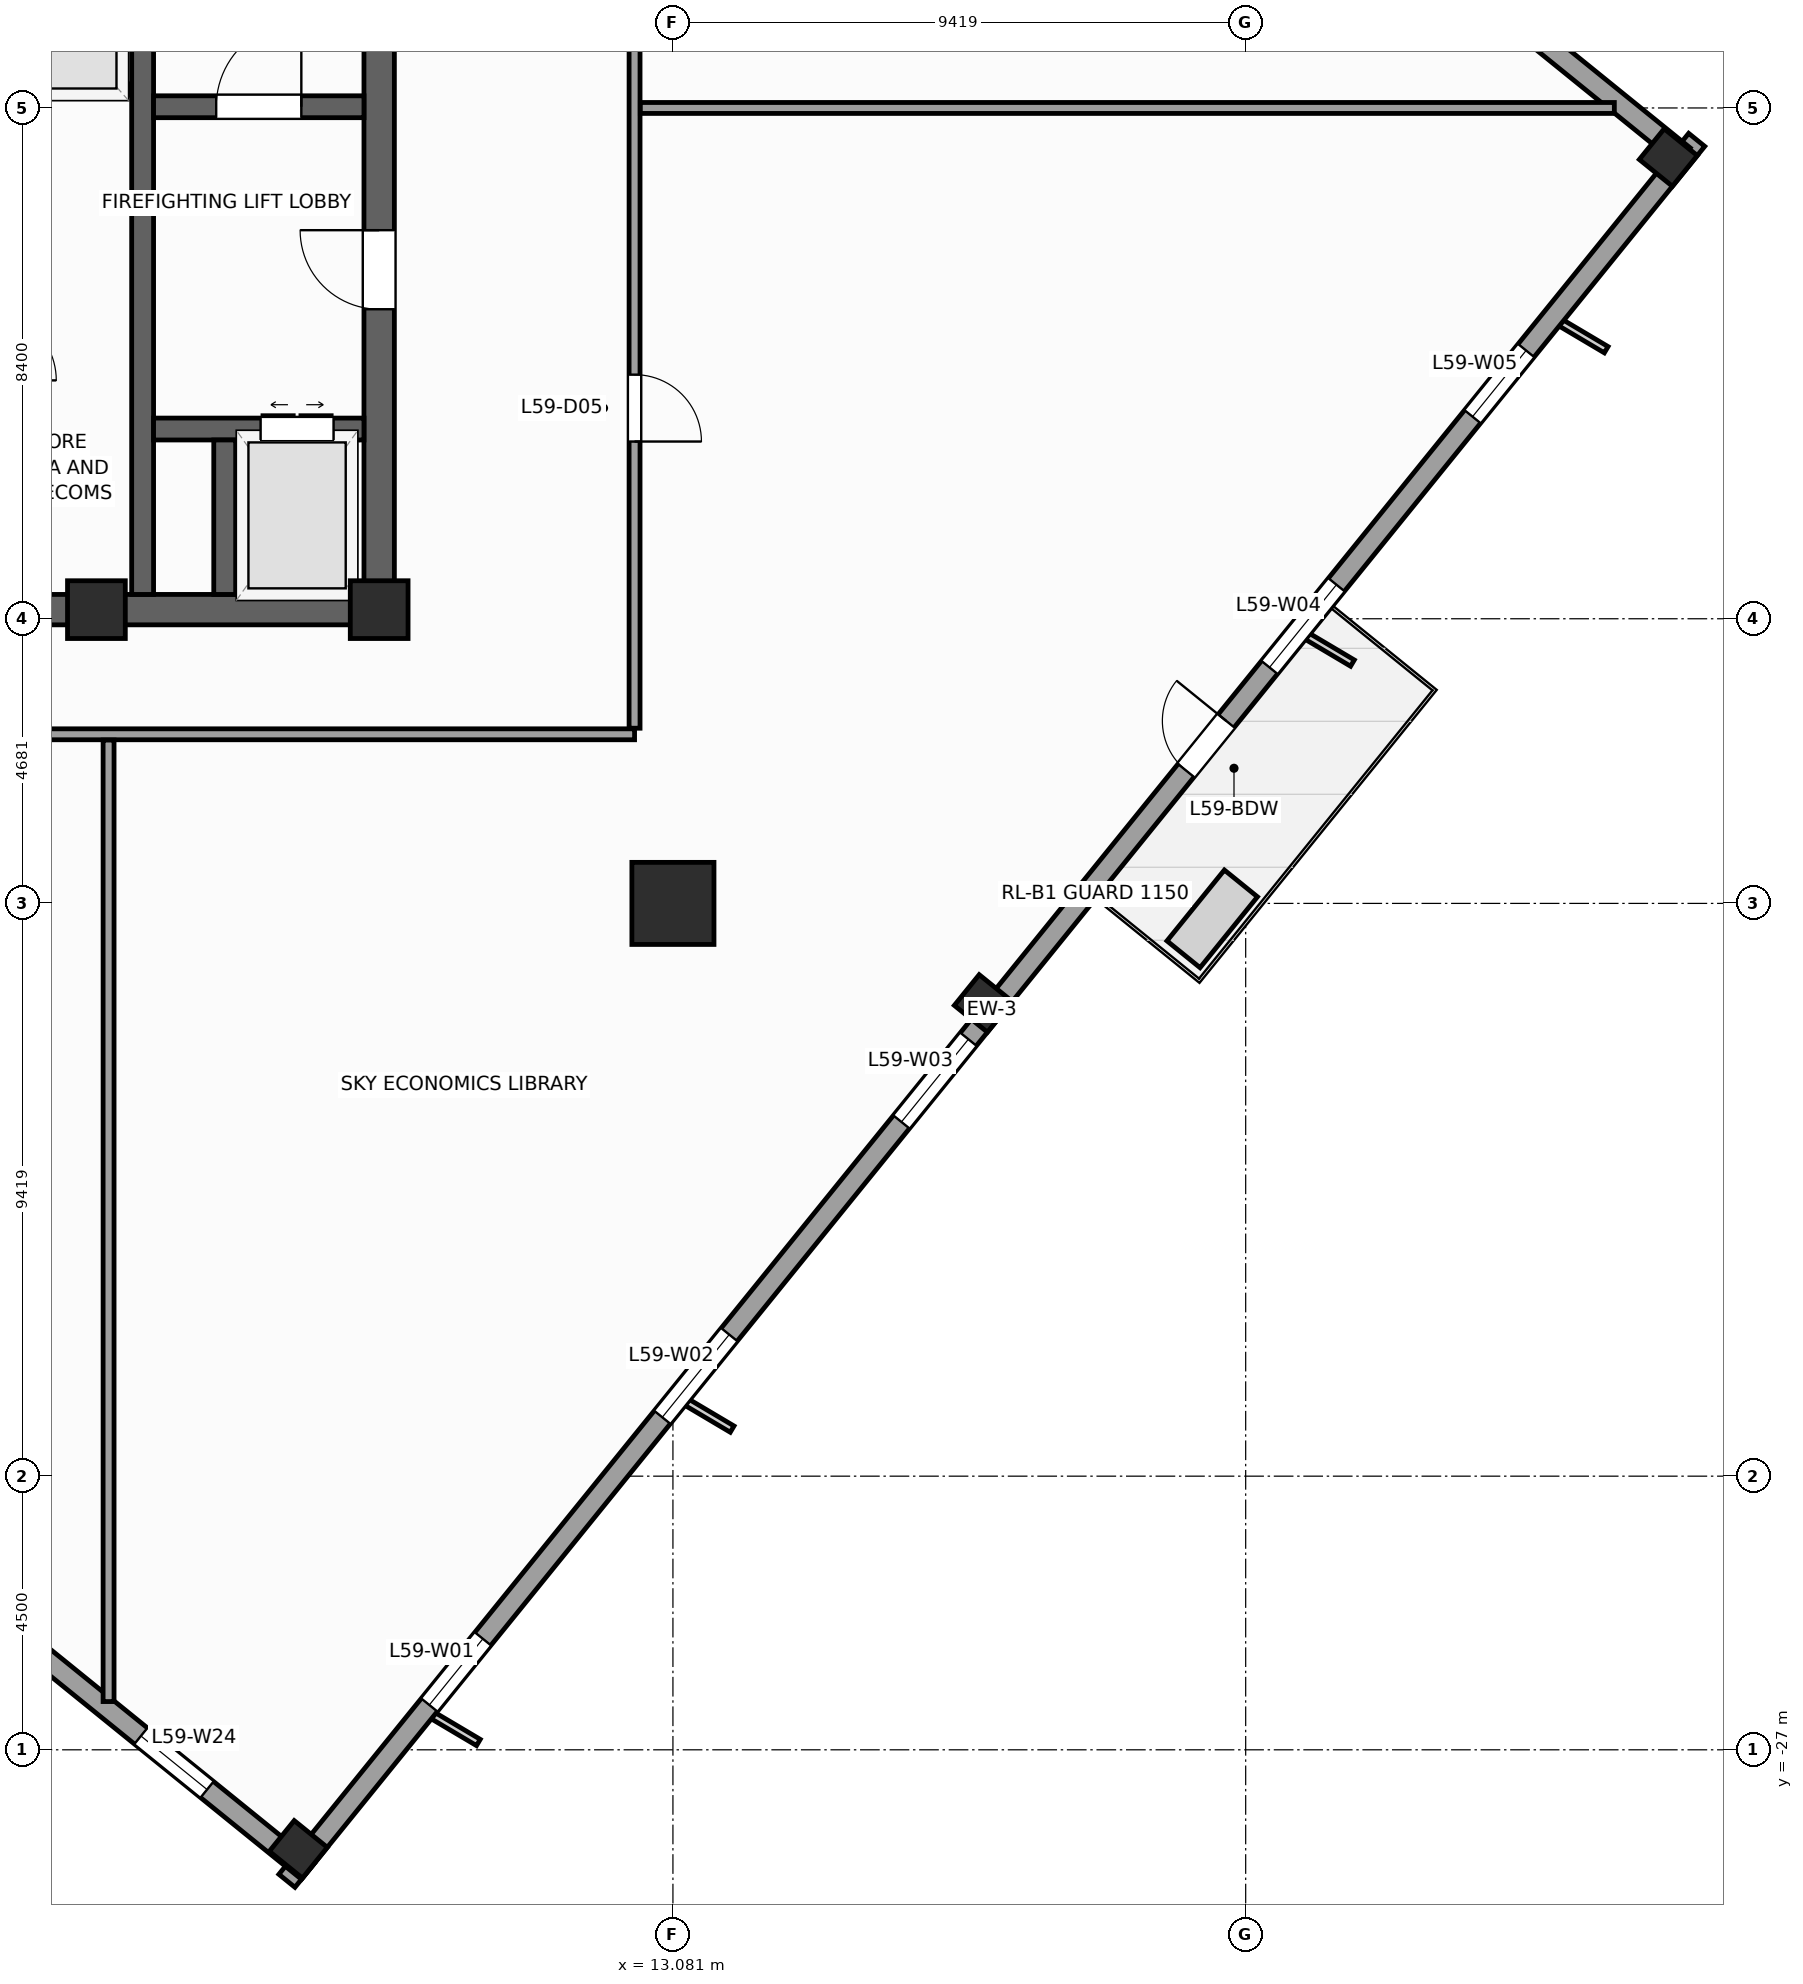
"""IFC4 building model, lengths in metres.
Left out: names, types, materials, properties, quantities, classifications, styles, units other than length and angle.
Written with IfcOpenShell. Run it as: python <this file> out.ifc"""

import sys

from ifc_helpers import new_model, si_unit, direction, frame, frame_2d, origin, origin_2d, place, context, subcontext, project, spatial, rectangle, extrude, source, transform, mapped, element, fill, save


model = new_model("IFC4")
c1 = context("Model", 3, precision=1e-05, world=origin(), true_north=direction((0.0, 1.0)))
c2 = subcontext(c1, "Body", "Model", "MODEL_VIEW")
j1 = project(units=[si_unit("LENGTHUNIT", "METRE"), si_unit("PLANEANGLEUNIT", "RADIAN")], contexts=[c1])
p1 = place(None, origin())
s1 = spatial("IfcSite", under=j1, at=p1, CompositionType="ELEMENT")
p2 = place(p1, origin())
s2 = spatial("IfcBuilding", under=s1, at=p2, CompositionType="ELEMENT")
p3 = place(p2, frame((0.0, 0.0, 244.6)))
s3 = spatial("IfcBuildingStorey", under=s2, at=p3, CompositionType="ELEMENT", Elevation=244.6)
p4 = place(p3, frame((-8.5, -8.25, 0.0), z_axis=(0.0, 0.0, 1.0), x_axis=(1.0, 0.0, 0.0)))
e1 = element("IfcWall", 1, at=p4, inside=s3, PredefinedType="SHEAR", context=c2, shape_type="SweptSolid", body=[
    extrude(rectangle(XDim=17.0, YDim=0.5, at=frame_2d((8.5, 0.0))), origin(), (0.0, 0.0, 1.0), 3.9),
])
p5 = place(p4, frame((7.85, 0.0, 0.0)))
e2 = element("IfcOpeningElement", 2, at=p5, cuts=e1, PredefinedType="OPENING", context=c2, shape_type="SweptSolid", body=[
    extrude(rectangle(XDim=1.3, YDim=2.2, at=frame_2d((0.65, 1.1))), frame((0.0, 0.26, 0.0), z_axis=(0.0, -1.0, 0.0), x_axis=(1.0, 0.0, 0.0)), (0.0, 0.0, 1.0), 0.52),
])
p6 = place(p3, frame((8.25, -8.0, 0.0), z_axis=(0.0, 0.0, 1.0), x_axis=(0.0, 1.0, 0.0)))
e3 = element("IfcWall", 3, at=p6, inside=s3, PredefinedType="SHEAR", context=c2, shape_type="SweptSolid", body=[
    extrude(rectangle(XDim=16.0, YDim=0.5, at=frame_2d((8.0, 0.0))), origin(), (0.0, 0.0, 1.0), 3.9),
])
p7 = place(p6, frame((4.69, 0.0, 0.0)))
e4 = element("IfcOpeningElement", 4, at=p7, cuts=e3, PredefinedType="OPENING", context=c2, shape_type="SweptSolid", body=[
    extrude(rectangle(XDim=1.3, YDim=2.2, at=frame_2d((0.65, 1.1))), frame((0.0, 0.26, 0.0), z_axis=(0.0, -1.0, 0.0), x_axis=(1.0, 0.0, 0.0)), (0.0, 0.0, 1.0), 0.52),
])
p8 = place(p3, frame((4.36, -8.0, 0.0), z_axis=(0.0, 0.0, 1.0), x_axis=(0.0, 1.0, 0.0)))
e5 = element("IfcWall", 5, at=p8, inside=s3, PredefinedType="SHEAR", context=c2, shape_type="SweptSolid", body=[
    extrude(rectangle(XDim=16.0, YDim=0.36, at=frame_2d((8.0, 0.0))), origin(), (0.0, 0.0, 1.0), 3.9),
])
p9 = place(p3, frame((4.54, 0.02, 0.0), z_axis=(0.0, 0.0, 1.0), x_axis=(1.0, 0.0, 0.0)))
e6 = element("IfcWall", 6, at=p9, inside=s3, PredefinedType="SHEAR", context=c2, shape_type="SweptSolid", body=[
    extrude(rectangle(XDim=3.46, YDim=0.36, at=frame_2d((1.73, 0.0))), origin(), (0.0, 0.0, 1.0), 3.9),
])
p10 = place(p9, frame((1.03, 0.0, 0.0)))
e7 = element("IfcOpeningElement", 7, at=p10, cuts=e6, PredefinedType="OPENING", context=c2, shape_type="SweptSolid", body=[
    extrude(rectangle(XDim=1.4, YDim=2.2, at=frame_2d((0.7, 1.1))), frame((0.0, 0.19, 0.0), z_axis=(0.0, -1.0, 0.0), x_axis=(1.0, 0.0, 0.0)), (0.0, 0.0, 1.0), 0.38),
])
p11 = place(p3, frame((4.54, -5.28, 0.0), z_axis=(0.0, 0.0, 1.0), x_axis=(1.0, 0.0, 0.0)))
e8 = element("IfcWall", 8, at=p11, inside=s3, PredefinedType="SHEAR", context=c2, shape_type="SweptSolid", body=[
    extrude(rectangle(XDim=3.46, YDim=0.36, at=frame_2d((1.73, 0.0))), origin(), (0.0, 0.0, 1.0), 3.9),
])
p12 = place(p11, frame((1.76, 0.0, 0.0)))
e9 = element("IfcOpeningElement", 9, at=p12, cuts=e8, PredefinedType="OPENING", context=c2, shape_type="SweptSolid", body=[
    extrude(rectangle(XDim=1.2, YDim=2.25, at=frame_2d((0.6, 1.125))), frame((0.0, 0.19, 0.0), z_axis=(0.0, -1.0, 0.0), x_axis=(1.0, 0.0, 0.0)), (0.0, 0.0, 1.0), 0.38),
])
p13 = place(p3, frame((5.71, -8.0, 0.0), z_axis=(0.0, 0.0, 1.0), x_axis=(0.0, 1.0, 0.0)))
e10 = element("IfcWall", 10, at=p13, inside=s3, PredefinedType="SHEAR", context=c2, shape_type="SweptSolid", body=[
    extrude(rectangle(XDim=2.54, YDim=0.36, at=frame_2d((1.27, 0.0))), origin(), (0.0, 0.0, 1.0), 3.9),
])
m1 = source(origin(), c2, "Body", "SweptSolid", [
    extrude(rectangle(XDim=0.95, YDim=0.95, at=origin_2d()), origin(), (0.0, 0.0, 1.0), 3.9),
])
for number, where, z_axis, x_axis in (
    (11, (8.25, -8.25, 0.0), (0.0, 0.0, 1.0), (1.0, 0.0, 0.0)),
    (12, (3.6, -8.25, 0.0), (0.0, 0.0, 1.0), (1.0, 0.0, 0.0)),
):
    element("IfcColumn", number, at=place(p3, frame(where, z_axis=z_axis, x_axis=x_axis)), inside=s3, PredefinedType="PILASTER", context=c2, shape_type="MappedRepresentation", body=[
        mapped(m1, transform((0.0, 0.0, 0.0), scale=1.0)),
    ])
m2 = source(origin(), c2, "Body", "SweptSolid", [
    extrude(rectangle(XDim=1.35, YDim=1.35, at=origin_2d()), origin(), (0.0, 0.0, 1.0), 3.9),
])
p14 = place(p3, frame((13.081, -13.081, 0.0), z_axis=(0.0, 0.0, 1.0), x_axis=(1.0, 0.0, 0.0)))
e13 = element("IfcColumn", 13, at=p14, inside=s3, PredefinedType="COLUMN", context=c2, shape_type="MappedRepresentation", body=[
    mapped(m2, transform((0.0, 0.0, 0.0), scale=1.0)),
])
m3 = source(origin(), c2, "Body", "SweptSolid", [
    extrude(rectangle(XDim=0.65, YDim=0.7, at=origin_2d()), origin(), (0.0, 0.0, 1.0), 3.9),
])
for number, where, z_axis, x_axis in (
    (14, (6.92, -28.637, 0.0), (0.0, 0.0, 1.0), (0.629, 0.777, 0.0)),
    (15, (18.185, -14.726, 0.0), (0.0, 0.0, 1.0), (0.629, 0.777, 0.0)),
    (16, (29.45, -0.815, 0.0), (0.0, 0.0, 1.0), (0.629, 0.777, 0.0)),
):
    element("IfcColumn", number, at=place(p3, frame(where, z_axis=z_axis, x_axis=x_axis)), inside=s3, PredefinedType="COLUMN", context=c2, shape_type="MappedRepresentation", body=[
        mapped(m3, transform((0.0, 0.0, 0.0), scale=1.0)),
    ])
p15 = place(p3, frame((6.733, -29.154, 0.0), z_axis=(0.0, 0.0, 1.0), x_axis=(0.629325378072, 0.77714192302, 0.0)))
e17 = element("IfcWall", 17, at=p15, inside=s3, PredefinedType="STANDARD", context=c2, shape_type="SweptSolid", body=[
    extrude(rectangle(XDim=36.84, YDim=0.34, at=frame_2d((18.42, 0.0))), origin(), (0.0, 0.0, 1.0), 2.96),
])
p16 = place(p15, frame((23.495, 0.0, 0.0)))
e18 = element("IfcOpeningElement", 18, at=p16, cuts=e17, PredefinedType="OPENING", context=c2, shape_type="SweptSolid", body=[
    extrude(rectangle(XDim=1.05, YDim=2.25, at=frame_2d((0.525, 1.125))), frame((0.0, 0.18, 0.0), z_axis=(0.0, -1.0, 0.0), x_axis=(1.0, 0.0, 0.0)), (0.0, 0.0, 1.0), 0.36),
])
p17 = place(p15, frame((3.721, 0.0, 0.48)))
e19 = element("IfcOpeningElement", 19, at=p17, cuts=e17, PredefinedType="OPENING", context=c2, shape_type="SweptSolid", body=[
    extrude(rectangle(XDim=1.4, YDim=2.4, at=frame_2d((0.7, 1.2))), frame((0.0, 0.18, 0.0), z_axis=(0.0, -1.0, 0.0), x_axis=(1.0, 0.0, 0.0)), (0.0, 0.0, 1.0), 0.36),
])
p18 = place(p15, frame((9.809, 0.0, 0.58)))
e20 = element("IfcOpeningElement", 20, at=p18, cuts=e17, PredefinedType="OPENING", context=c2, shape_type="SweptSolid", body=[
    extrude(rectangle(XDim=1.75, YDim=2.3, at=frame_2d((0.875, 1.15))), frame((0.0, 0.18, 0.0), z_axis=(0.0, -1.0, 0.0), x_axis=(1.0, 0.0, 0.0)), (0.0, 0.0, 1.0), 0.36),
])
p19 = place(p15, frame((16.058, 0.0, 0.58)))
e21 = element("IfcOpeningElement", 21, at=p19, cuts=e17, PredefinedType="OPENING", context=c2, shape_type="SweptSolid", body=[
    extrude(rectangle(XDim=1.75, YDim=2.3, at=frame_2d((0.875, 1.15))), frame((0.0, 0.18, 0.0), z_axis=(0.0, -1.0, 0.0), x_axis=(1.0, 0.0, 0.0)), (0.0, 0.0, 1.0), 0.36),
])
p20 = place(p15, frame((25.676, 0.0, 0.58)))
e22 = element("IfcOpeningElement", 22, at=p20, cuts=e17, PredefinedType="OPENING", context=c2, shape_type="SweptSolid", body=[
    extrude(rectangle(XDim=1.75, YDim=2.3, at=frame_2d((0.875, 1.15))), frame((0.0, 0.18, 0.0), z_axis=(0.0, -1.0, 0.0), x_axis=(1.0, 0.0, 0.0)), (0.0, 0.0, 1.0), 0.36),
])
p21 = place(p15, frame((30.982, 0.0, 0.48)))
e23 = element("IfcOpeningElement", 23, at=p21, cuts=e17, PredefinedType="OPENING", context=c2, shape_type="SweptSolid", body=[
    extrude(rectangle(XDim=1.4, YDim=2.4, at=frame_2d((0.7, 1.2))), frame((0.0, 0.18, 0.0), z_axis=(0.0, -1.0, 0.0), x_axis=(1.0, 0.0, 0.0)), (0.0, 0.0, 1.0), 0.36),
])
p22 = place(p3, frame((29.703, -0.789, 0.0), z_axis=(0.0, 0.0, 1.0), x_axis=(-0.77714355312, 0.629323365087, 0.0)))
e24 = element("IfcWall", 24, at=p22, inside=s3, PredefinedType="STANDARD", context=c2, shape_type="SweptSolid", body=[
    extrude(rectangle(XDim=5.5, YDim=0.34, at=frame_2d((2.75, 0.0))), origin(), (0.0, 0.0, 1.0), 3.66),
])
p23 = place(p3, frame((2.673, -25.429, 0.0), z_axis=(0.0, 0.0, 1.0), x_axis=(0.777162640055, -0.629299794138, 0.0)))
e25 = element("IfcWall", 25, at=p23, inside=s3, PredefinedType="STANDARD", context=c2, shape_type="SweptSolid", body=[
    extrude(rectangle(XDim=5.67, YDim=0.34, at=frame_2d((2.835, 0.0))), origin(), (0.0, 0.0, 1.0), 3.66),
])
p24 = place(p23, frame((2.135, 0.0, 0.48)))
e26 = element("IfcOpeningElement", 26, at=p24, cuts=e25, PredefinedType="OPENING", context=c2, shape_type="SweptSolid", body=[
    extrude(rectangle(XDim=1.4, YDim=2.4, at=frame_2d((0.7, 1.2))), frame((0.0, 0.18, 0.0), z_axis=(0.0, -1.0, 0.0), x_axis=(1.0, 0.0, 0.0)), (0.0, 0.0, 1.0), 0.36),
])
p25 = place(p3, frame((1.89, 0.3, 0.0), z_axis=(0.0, 0.0, 1.0), x_axis=(1.0, 0.0, 0.0)))
e27 = element("IfcWall", 27, at=p25, inside=s3, PredefinedType="PARTITIONING", context=c2, shape_type="SweptSolid", body=[
    extrude(rectangle(XDim=2.28, YDim=0.18, at=frame_2d((1.14, 0.0))), origin(), (0.0, 0.0, 1.0), 3.66),
])
p26 = place(p3, frame((-10.3, -10.3, 0.0), z_axis=(0.0, 0.0, 1.0), x_axis=(1.0, 0.0, 0.0)))
e28 = element("IfcWall", 28, at=p26, inside=s3, PredefinedType="PARTITIONING", context=c2, shape_type="SweptSolid", body=[
    extrude(rectangle(XDim=22.75, YDim=0.18, at=frame_2d((11.375, 0.0))), origin(), (0.0, 0.0, 1.0), 3.66),
])
p27 = place(p26, frame((9.75, 0.0, 0.0)))
e29 = element("IfcOpeningElement", 29, at=p27, cuts=e28, PredefinedType="OPENING", context=c2, shape_type="SweptSolid", body=[
    extrude(rectangle(XDim=1.1, YDim=2.2, at=frame_2d((0.55, 1.1))), frame((0.0, 0.1, 0.0), z_axis=(0.0, -1.0, 0.0), x_axis=(1.0, 0.0, 0.0)), (0.0, 0.0, 1.0), 0.2),
])
p28 = place(p26, frame((2.865, 0.0, 0.0)))
e30 = element("IfcOpeningElement", 30, at=p28, cuts=e28, PredefinedType="OPENING", context=c2, shape_type="SweptSolid", body=[
    extrude(rectangle(XDim=1.1, YDim=2.2, at=frame_2d((0.55, 1.1))), frame((0.0, 0.1, 0.0), z_axis=(0.0, -1.0, 0.0), x_axis=(1.0, 0.0, 0.0)), (0.0, 0.0, 1.0), 0.2),
])
p29 = place(p3, frame((12.45, -10.2, 0.0), z_axis=(0.0, 0.0, 1.0), x_axis=(0.0, 1.0, 0.0)))
e31 = element("IfcWall", 31, at=p29, inside=s3, PredefinedType="PARTITIONING", context=c2, shape_type="SweptSolid", body=[
    extrude(rectangle(XDim=21.5, YDim=0.18, at=frame_2d((10.75, 0.0))), origin(), (0.0, 0.0, 1.0), 3.66),
])
p30 = place(p29, frame((15.135, 0.0, 0.0)))
e32 = element("IfcOpeningElement", 32, at=p30, cuts=e31, PredefinedType="OPENING", context=c2, shape_type="SweptSolid", body=[
    extrude(rectangle(XDim=1.1, YDim=2.2, at=frame_2d((0.55, 1.1))), frame((0.0, 0.1, 0.0), z_axis=(0.0, -1.0, 0.0), x_axis=(1.0, 0.0, 0.0)), (0.0, 0.0, 1.0), 0.2),
])
p31 = place(p29, frame((4.714, 0.0, 0.0)))
e33 = element("IfcOpeningElement", 33, at=p31, cuts=e31, PredefinedType="OPENING", context=c2, shape_type="SweptSolid", body=[
    extrude(rectangle(XDim=1.1, YDim=2.2, at=frame_2d((0.55, 1.1))), frame((0.0, 0.1, 0.0), z_axis=(0.0, -1.0, 0.0), x_axis=(1.0, 0.0, 0.0)), (0.0, 0.0, 1.0), 0.2),
])
p32 = place(p3, frame((12.545, 0.0, 0.0), z_axis=(0.0, 0.0, 1.0), x_axis=(1.0, 0.0, 0.0)))
e34 = element("IfcWall", 34, at=p32, inside=s3, PredefinedType="PARTITIONING", context=c2, shape_type="SweptSolid", body=[
    extrude(rectangle(XDim=16.018, YDim=0.18, at=frame_2d((8.009, 0.0))), origin(), (0.0, 0.0, 1.0), 3.66),
])
p33 = place(p3, frame((3.8, -10.395, 0.0), z_axis=(0.0, 0.0, 1.0), x_axis=(0.0, -1.0, 0.0)))
e35 = element("IfcWall", 35, at=p33, inside=s3, PredefinedType="PARTITIONING", context=c2, shape_type="SweptSolid", body=[
    extrude(rectangle(XDim=15.812, YDim=0.18, at=frame_2d((7.906, 0.0))), origin(), (0.0, 0.0, 1.0), 3.66),
])
m4 = source(origin(), c2, "Body", "SweptSolid", [
    extrude(rectangle(XDim=1.05, YDim=2.25, at=frame_2d((0.525, 1.125))), frame((0.0, 0.025, 0.0), z_axis=(0.0, -1.0, 0.0), x_axis=(1.0, 0.0, 0.0)), (0.0, 0.0, 1.0), 0.05),
])
p34 = place(p16, origin())
e36 = element("IfcDoor", 36, at=p34, inside=s3, OperationType="SINGLE_SWING_RIGHT", PredefinedType="DOOR", context=c2, shape_type="MappedRepresentation", body=[
    mapped(m4, transform((0.0, 0.0, 0.0), scale=1.0)),
])
fill(e18, e36)
m5 = source(origin(), c2, "Body", "SweptSolid", [
    extrude(rectangle(XDim=1.4, YDim=2.4, at=frame_2d((0.7, 1.2))), frame((0.0, 0.03, 0.0), z_axis=(0.0, -1.0, 0.0), x_axis=(1.0, 0.0, 0.0)), (0.0, 0.0, 1.0), 0.06),
])
p35 = place(p17, origin())
e37 = element("IfcWindow", 37, at=p35, inside=s3, PartitioningType="SINGLE_PANEL", PredefinedType="WINDOW", context=c2, shape_type="MappedRepresentation", body=[
    mapped(m5, transform((0.0, 0.0, 0.0), scale=1.0)),
])
fill(e19, e37)
m6 = source(origin(), c2, "Body", "SweptSolid", [
    extrude(rectangle(XDim=1.75, YDim=2.3, at=frame_2d((0.875, 1.15))), frame((0.0, 0.03, 0.0), z_axis=(0.0, -1.0, 0.0), x_axis=(1.0, 0.0, 0.0)), (0.0, 0.0, 1.0), 0.06),
])
p36 = place(p18, origin())
e38 = element("IfcWindow", 38, at=p36, inside=s3, PartitioningType="SINGLE_PANEL", PredefinedType="WINDOW", context=c2, shape_type="MappedRepresentation", body=[
    mapped(m6, transform((0.0, 0.0, 0.0), scale=1.0)),
])
fill(e20, e38)
p37 = place(p19, origin())
e39 = element("IfcWindow", 39, at=p37, inside=s3, PartitioningType="SINGLE_PANEL", PredefinedType="WINDOW", context=c2, shape_type="MappedRepresentation", body=[
    mapped(m6, transform((0.0, 0.0, 0.0), scale=1.0)),
])
fill(e21, e39)
p38 = place(p20, origin())
e40 = element("IfcWindow", 40, at=p38, inside=s3, PartitioningType="SINGLE_PANEL", PredefinedType="WINDOW", context=c2, shape_type="MappedRepresentation", body=[
    mapped(m6, transform((0.0, 0.0, 0.0), scale=1.0)),
])
fill(e22, e40)
p39 = place(p21, origin())
e41 = element("IfcWindow", 41, at=p39, inside=s3, PartitioningType="SINGLE_PANEL", PredefinedType="WINDOW", context=c2, shape_type="MappedRepresentation", body=[
    mapped(m5, transform((0.0, 0.0, 0.0), scale=1.0)),
])
fill(e23, e41)
p40 = place(p24, origin())
e42 = element("IfcWindow", 42, at=p40, inside=s3, PartitioningType="SINGLE_PANEL", PredefinedType="WINDOW", context=c2, shape_type="MappedRepresentation", body=[
    mapped(m5, transform((0.0, 0.0, 0.0), scale=1.0)),
])
fill(e26, e42)
m7 = source(origin(), c2, "Body", "SweptSolid", [
    extrude(rectangle(XDim=1.4, YDim=2.2, at=frame_2d((0.7, 1.1))), frame((0.0, 0.025, 0.0), z_axis=(0.0, -1.0, 0.0), x_axis=(1.0, 0.0, 0.0)), (0.0, 0.0, 1.0), 0.05),
])
p41 = place(p10, origin())
e43 = element("IfcDoor", 43, at=p41, inside=s3, OperationType="SINGLE_SWING_RIGHT", PredefinedType="DOOR", context=c2, shape_type="MappedRepresentation", body=[
    mapped(m7, transform((0.0, 0.0, 0.0), scale=1.0)),
])
fill(e7, e43)
m8 = source(origin(), c2, "Body", "SweptSolid", [
    extrude(rectangle(XDim=1.3, YDim=2.2, at=frame_2d((0.65, 1.1))), frame((0.0, 0.025, 0.0), z_axis=(0.0, -1.0, 0.0), x_axis=(1.0, 0.0, 0.0)), (0.0, 0.0, 1.0), 0.05),
])
p42 = place(p7, origin())
e44 = element("IfcDoor", 44, at=p42, inside=s3, OperationType="SINGLE_SWING_RIGHT", PredefinedType="DOOR", context=c2, shape_type="MappedRepresentation", body=[
    mapped(m8, transform((0.0, 0.0, 0.0), scale=1.0)),
])
fill(e4, e44)
m9 = source(origin(), c2, "Body", "SweptSolid", [
    extrude(rectangle(XDim=1.2, YDim=2.25, at=frame_2d((0.6, 1.125))), frame((0.0, 0.025, 0.0), z_axis=(0.0, -1.0, 0.0), x_axis=(1.0, 0.0, 0.0)), (0.0, 0.0, 1.0), 0.05),
])
p43 = place(p12, origin())
e45 = element("IfcDoor", 45, at=p43, inside=s3, OperationType="DOUBLE_DOOR_SLIDING", PredefinedType="DOOR", context=c2, shape_type="MappedRepresentation", body=[
    mapped(m9, transform((0.0, 0.0, 0.0), scale=1.0)),
])
fill(e9, e45)
m10 = source(origin(), c2, "Body", "SweptSolid", [
    extrude(rectangle(XDim=1.1, YDim=2.2, at=frame_2d((0.55, 1.1))), frame((0.0, 0.025, 0.0), z_axis=(0.0, -1.0, 0.0), x_axis=(1.0, 0.0, 0.0)), (0.0, 0.0, 1.0), 0.05),
])
p44 = place(p31, frame((1.1, 0.0, 0.0), z_axis=(0.0, 0.0, 1.0), x_axis=(-1.0, 0.0, 0.0)))
e46 = element("IfcDoor", 46, at=p44, inside=s3, OperationType="SINGLE_SWING_LEFT", PredefinedType="DOOR", context=c2, shape_type="MappedRepresentation", body=[
    mapped(m10, transform((0.0, 0.0, 0.0), scale=1.0)),
])
fill(e33, e46)
save(model, sys.argv[1])
